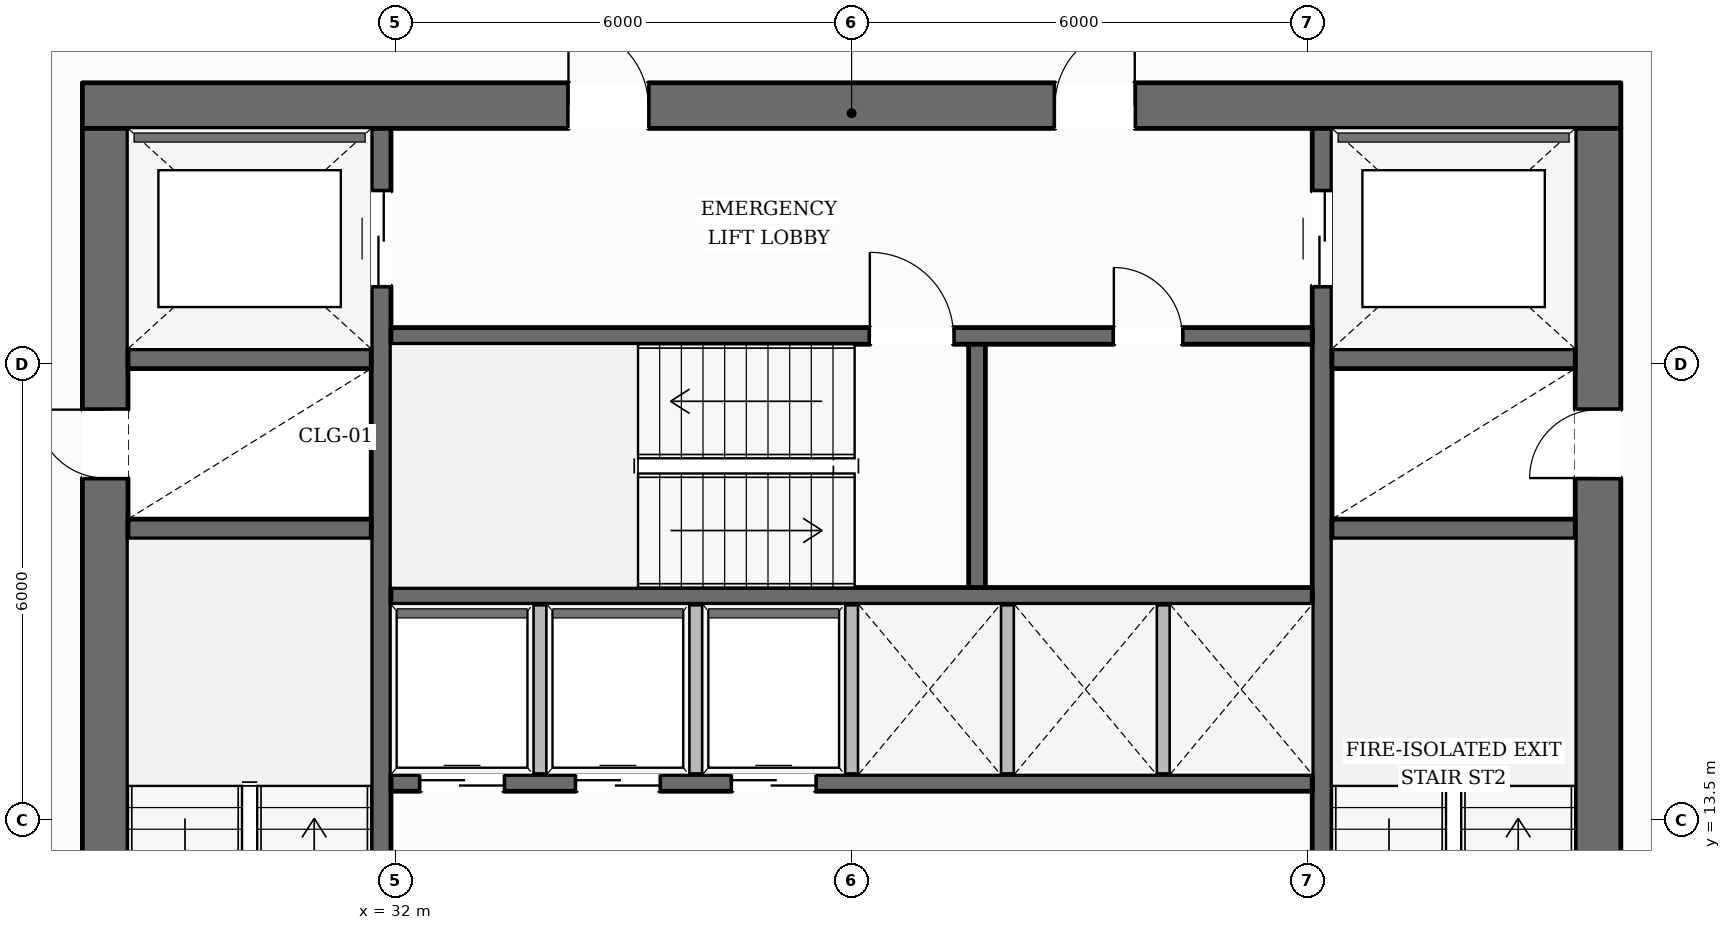
"""IFC4 building model, lengths in metres.
Left out: names, types, materials, properties, quantities, classifications, styles, units other than length and angle.
Written with IfcOpenShell. Run it as: python <this file> out.ifc"""

import sys

from ifc_helpers import new_model, si_unit, direction, frame, frame_2d, origin, place, context, subcontext, project, spatial, rectangle, extrude, element, fill, save


model = new_model("IFC4")
c1 = context("Model", 3, precision=1e-05, world=origin(), true_north=direction((0.0, 1.0)))
c2 = subcontext(c1, "Body", "Model", "MODEL_VIEW")
j1 = project(units=[si_unit("LENGTHUNIT", "METRE"), si_unit("PLANEANGLEUNIT", "RADIAN")], contexts=[c1])
p1 = place(None, origin())
s1 = spatial("IfcSite", under=j1, at=p1, CompositionType="ELEMENT")
p2 = place(p1, origin())
s2 = spatial("IfcBuilding", under=s1, at=p2, CompositionType="ELEMENT")
p3 = place(p2, frame((0.0, 0.0, 25.25)))
s3 = spatial("IfcBuildingStorey", under=s2, at=p3, CompositionType="ELEMENT", Elevation=25.25)
p4 = place(p3, frame((27.88, 22.9, 0.0), z_axis=(0.0, 0.0, 1.0), x_axis=(1.0, 0.0, 0.0)))
e1 = element("IfcWall", 1, at=p4, inside=s3, PredefinedType="SOLIDWALL", context=c2, shape_type="SweptSolid", body=[
    extrude(rectangle(XDim=20.24, YDim=0.6, at=frame_2d((10.12, 0.0))), origin(), (0.0, 0.0, 1.0), 3.59),
])
p5 = place(p4, frame((6.395, 0.0, 0.0)))
e2 = element("IfcOpeningElement", 2, at=p5, cuts=e1, PredefinedType="OPENING", context=c2, shape_type="SweptSolid", body=[
    extrude(rectangle(XDim=1.05, YDim=2.15, at=frame_2d((0.525, 1.075))), frame((0.0, 0.31, 0.0), z_axis=(0.0, -1.0, 0.0), x_axis=(1.0, 0.0, 0.0)), (0.0, 0.0, 1.0), 0.62),
])
p6 = place(p4, frame((12.795, 0.0, 0.0)))
e3 = element("IfcOpeningElement", 3, at=p6, cuts=e1, PredefinedType="OPENING", context=c2, shape_type="SweptSolid", body=[
    extrude(rectangle(XDim=1.05, YDim=2.15, at=frame_2d((0.525, 1.075))), frame((0.0, 0.31, 0.0), z_axis=(0.0, -1.0, 0.0), x_axis=(1.0, 0.0, 0.0)), (0.0, 0.0, 1.0), 0.62),
])
p7 = place(p3, frame((28.18, 9.6, 0.0), z_axis=(0.0, 0.0, 1.0), x_axis=(0.0, 1.0, 0.0)))
e4 = element("IfcWall", 4, at=p7, inside=s3, PredefinedType="SOLIDWALL", context=c2, shape_type="SweptSolid", body=[
    extrude(rectangle(XDim=13.0, YDim=0.6, at=frame_2d((6.5, 0.0))), origin(), (0.0, 0.0, 1.0), 3.59),
])
p8 = place(p7, frame((0.2, 0.0, 0.0)))
e5 = element("IfcOpeningElement", 5, at=p8, cuts=e4, PredefinedType="OPENING", context=c2, shape_type="SweptSolid", body=[
    extrude(rectangle(XDim=1.1, YDim=2.15, at=frame_2d((0.55, 1.075))), frame((0.0, 0.31, 0.0), z_axis=(0.0, -1.0, 0.0), x_axis=(1.0, 0.0, 0.0)), (0.0, 0.0, 1.0), 0.62),
])
p9 = place(p7, frame((8.4, 0.0, 0.0)))
e6 = element("IfcOpeningElement", 6, at=p9, cuts=e4, PredefinedType="OPENING", context=c2, shape_type="SweptSolid", body=[
    extrude(rectangle(XDim=0.9, YDim=2.1, at=frame_2d((0.45, 1.05))), frame((0.0, 0.31, 0.0), z_axis=(0.0, -1.0, 0.0), x_axis=(1.0, 0.0, 0.0)), (0.0, 0.0, 1.0), 0.62),
])
p10 = place(p3, frame((47.82, 9.6, 0.0), z_axis=(0.0, 0.0, 1.0), x_axis=(0.0, 1.0, 0.0)))
e7 = element("IfcWall", 7, at=p10, inside=s3, PredefinedType="SOLIDWALL", context=c2, shape_type="SweptSolid", body=[
    extrude(rectangle(XDim=13.0, YDim=0.6, at=frame_2d((6.5, 0.0))), origin(), (0.0, 0.0, 1.0), 3.59),
])
p11 = place(p10, frame((0.2, 0.0, 0.0)))
e8 = element("IfcOpeningElement", 8, at=p11, cuts=e7, PredefinedType="OPENING", context=c2, shape_type="SweptSolid", body=[
    extrude(rectangle(XDim=1.1, YDim=2.15, at=frame_2d((0.55, 1.075))), frame((0.0, 0.31, 0.0), z_axis=(0.0, -1.0, 0.0), x_axis=(1.0, 0.0, 0.0)), (0.0, 0.0, 1.0), 0.62),
])
p12 = place(p10, frame((8.4, 0.0, 0.0)))
e9 = element("IfcOpeningElement", 9, at=p12, cuts=e7, PredefinedType="OPENING", context=c2, shape_type="SweptSolid", body=[
    extrude(rectangle(XDim=0.9, YDim=2.1, at=frame_2d((0.45, 1.05))), frame((0.0, 0.31, 0.0), z_axis=(0.0, -1.0, 0.0), x_axis=(1.0, 0.0, 0.0)), (0.0, 0.0, 1.0), 0.62),
])
p13 = place(p3, frame((31.81, 9.6, 0.0), z_axis=(0.0, 0.0, 1.0), x_axis=(0.0, 1.0, 0.0)))
e10 = element("IfcWall", 10, at=p13, inside=s3, PredefinedType="SHEAR", context=c2, shape_type="SweptSolid", body=[
    extrude(rectangle(XDim=13.0, YDim=0.26, at=frame_2d((6.5, 0.0))), origin(), (0.0, 0.0, 1.0), 3.59),
])
p14 = place(p13, frame((10.925, 0.0, 0.0)))
e11 = element("IfcOpeningElement", 11, at=p14, cuts=e10, PredefinedType="OPENING", context=c2, shape_type="SweptSolid", body=[
    extrude(rectangle(XDim=1.25, YDim=2.25, at=frame_2d((0.625, 1.125))), frame((0.0, 0.14, 0.0), z_axis=(0.0, -1.0, 0.0), x_axis=(1.0, 0.0, 0.0)), (0.0, 0.0, 1.0), 0.28),
])
p15 = place(p3, frame((44.19, 9.6, 0.0), z_axis=(0.0, 0.0, 1.0), x_axis=(0.0, 1.0, 0.0)))
e12 = element("IfcWall", 12, at=p15, inside=s3, PredefinedType="SHEAR", context=c2, shape_type="SweptSolid", body=[
    extrude(rectangle(XDim=13.0, YDim=0.26, at=frame_2d((6.5, 0.0))), origin(), (0.0, 0.0, 1.0), 3.59),
])
p16 = place(p15, frame((10.925, 0.0, 0.0)))
e13 = element("IfcOpeningElement", 13, at=p16, cuts=e12, PredefinedType="OPENING", context=c2, shape_type="SweptSolid", body=[
    extrude(rectangle(XDim=1.25, YDim=2.25, at=frame_2d((0.625, 1.125))), frame((0.0, 0.14, 0.0), z_axis=(0.0, -1.0, 0.0), x_axis=(1.0, 0.0, 0.0)), (0.0, 0.0, 1.0), 0.28),
])
for number, where, z_axis, x_axis in (
    (14, (28.48, 17.33, 0.0), (0.0, 0.0, 1.0), (1.0, 0.0, 0.0)),
    (15, (28.48, 19.57, 0.0), (0.0, 0.0, 1.0), (1.0, 0.0, 0.0)),
    (16, (44.32, 17.33, 0.0), (0.0, 0.0, 1.0), (1.0, 0.0, 0.0)),
    (17, (44.32, 19.57, 0.0), (0.0, 0.0, 1.0), (1.0, 0.0, 0.0)),
):
    element("IfcWall", number, at=place(p3, frame(where, z_axis=z_axis, x_axis=x_axis)), inside=s3, PredefinedType="SHEAR", context=c2, shape_type="SweptSolid", body=[
        extrude(rectangle(XDim=3.2, YDim=0.26, at=frame_2d((1.6, 0.0))), origin(), (0.0, 0.0, 1.0), 3.59),
    ])
p17 = place(p3, frame((31.94, 19.87, 0.0), z_axis=(0.0, 0.0, 1.0), x_axis=(1.0, 0.0, 0.0)))
e18 = element("IfcWall", 18, at=p17, inside=s3, PredefinedType="SOLIDWALL", context=c2, shape_type="SweptSolid", body=[
    extrude(rectangle(XDim=12.12, YDim=0.22, at=frame_2d((6.06, 0.0))), origin(), (0.0, 0.0, 1.0), 3.59),
])
p18 = place(p17, frame((6.3, 0.0, 0.0)))
e19 = element("IfcOpeningElement", 19, at=p18, cuts=e18, PredefinedType="OPENING", context=c2, shape_type="SweptSolid", body=[
    extrude(rectangle(XDim=1.1, YDim=2.15, at=frame_2d((0.55, 1.075))), frame((0.0, 0.12, 0.0), z_axis=(0.0, -1.0, 0.0), x_axis=(1.0, 0.0, 0.0)), (0.0, 0.0, 1.0), 0.24),
])
p19 = place(p17, frame((9.51, 0.0, 0.0)))
e20 = element("IfcOpeningElement", 20, at=p19, cuts=e18, PredefinedType="OPENING", context=c2, shape_type="SweptSolid", body=[
    extrude(rectangle(XDim=0.9, YDim=2.1, at=frame_2d((0.45, 1.05))), frame((0.0, 0.12, 0.0), z_axis=(0.0, -1.0, 0.0), x_axis=(1.0, 0.0, 0.0)), (0.0, 0.0, 1.0), 0.24),
])
p20 = place(p3, frame((31.94, 16.45, 0.0), z_axis=(0.0, 0.0, 1.0), x_axis=(1.0, 0.0, 0.0)))
e21 = element("IfcWall", 21, at=p20, inside=s3, PredefinedType="SOLIDWALL", context=c2, shape_type="SweptSolid", body=[
    extrude(rectangle(XDim=12.12, YDim=0.22, at=frame_2d((6.06, 0.0))), origin(), (0.0, 0.0, 1.0), 3.59),
])
p21 = place(p3, frame((39.65, 16.56, 0.0), z_axis=(0.0, 0.0, 1.0), x_axis=(0.0, 1.0, 0.0)))
e22 = element("IfcWall", 22, at=p21, inside=s3, PredefinedType="SOLIDWALL", context=c2, shape_type="SweptSolid", body=[
    extrude(rectangle(XDim=3.2, YDim=0.22, at=frame_2d((1.6, 0.0))), origin(), (0.0, 0.0, 1.0), 3.59),
])
p22 = place(p3, frame((31.94, 13.99, 0.0), z_axis=(0.0, 0.0, 1.0), x_axis=(1.0, 0.0, 0.0)))
e23 = element("IfcWall", 23, at=p22, inside=s3, PredefinedType="SOLIDWALL", context=c2, shape_type="SweptSolid", body=[
    extrude(rectangle(XDim=12.12, YDim=0.22, at=frame_2d((6.06, 0.0))), origin(), (0.0, 0.0, 1.0), 3.59),
])
p23 = place(p22, frame((0.385, 0.0, 0.0)))
e24 = element("IfcOpeningElement", 24, at=p23, cuts=e23, PredefinedType="OPENING", context=c2, shape_type="SweptSolid", body=[
    extrude(rectangle(XDim=1.1, YDim=2.2, at=frame_2d((0.55, 1.1))), frame((0.0, 0.12, 0.0), z_axis=(0.0, -1.0, 0.0), x_axis=(1.0, 0.0, 0.0)), (0.0, 0.0, 1.0), 0.24),
])
p24 = place(p22, frame((2.435, 0.0, 0.0)))
e25 = element("IfcOpeningElement", 25, at=p24, cuts=e23, PredefinedType="OPENING", context=c2, shape_type="SweptSolid", body=[
    extrude(rectangle(XDim=1.1, YDim=2.2, at=frame_2d((0.55, 1.1))), frame((0.0, 0.12, 0.0), z_axis=(0.0, -1.0, 0.0), x_axis=(1.0, 0.0, 0.0)), (0.0, 0.0, 1.0), 0.24),
])
p25 = place(p22, frame((4.485, 0.0, 0.0)))
e26 = element("IfcOpeningElement", 26, at=p25, cuts=e23, PredefinedType="OPENING", context=c2, shape_type="SweptSolid", body=[
    extrude(rectangle(XDim=1.1, YDim=2.2, at=frame_2d((0.55, 1.1))), frame((0.0, 0.12, 0.0), z_axis=(0.0, -1.0, 0.0), x_axis=(1.0, 0.0, 0.0)), (0.0, 0.0, 1.0), 0.24),
])
p26 = place(p3, frame((13.263, 14.928, 0.0), z_axis=(0.0, 0.0, 1.0), x_axis=(0.495711630902, 0.868487178367, 0.0)))
e27 = element("IfcWall", 27, at=p26, inside=s3, PredefinedType="STANDARD", context=c2, shape_type="SweptSolid", body=[
    extrude(rectangle(XDim=34.092, YDim=0.38, at=frame_2d((17.046, 0.0))), origin(), (0.0, 0.0, 1.0), 2.97),
])
p27 = place(p26, frame((30.027, 0.0, 0.65)))
e28 = element("IfcOpeningElement", 28, at=p27, cuts=e27, PredefinedType="OPENING", context=c2, shape_type="SweptSolid", body=[
    extrude(rectangle(XDim=1.65, YDim=1.75, at=frame_2d((0.825, 0.875))), frame((0.0, 0.2, 0.0), z_axis=(0.0, -1.0, 0.0), x_axis=(1.0, 0.0, 0.0)), (0.0, 0.0, 1.0), 0.4),
])
p28 = place(p26, frame((24.504, 0.0, 0.65)))
e29 = element("IfcOpeningElement", 29, at=p28, cuts=e27, PredefinedType="OPENING", context=c2, shape_type="SweptSolid", body=[
    extrude(rectangle(XDim=1.65, YDim=1.75, at=frame_2d((0.825, 0.875))), frame((0.0, 0.2, 0.0), z_axis=(0.0, -1.0, 0.0), x_axis=(1.0, 0.0, 0.0)), (0.0, 0.0, 1.0), 0.4),
])
p29 = place(p26, frame((13.457, 0.0, 0.65)))
e30 = element("IfcOpeningElement", 30, at=p29, cuts=e27, PredefinedType="OPENING", context=c2, shape_type="SweptSolid", body=[
    extrude(rectangle(XDim=1.65, YDim=1.75, at=frame_2d((0.825, 0.875))), frame((0.0, 0.2, 0.0), z_axis=(0.0, -1.0, 0.0), x_axis=(1.0, 0.0, 0.0)), (0.0, 0.0, 1.0), 0.4),
])
p30 = place(p26, frame((7.934, 0.0, 0.65)))
e31 = element("IfcOpeningElement", 31, at=p30, cuts=e27, PredefinedType="OPENING", context=c2, shape_type="SweptSolid", body=[
    extrude(rectangle(XDim=1.65, YDim=1.75, at=frame_2d((0.825, 0.875))), frame((0.0, 0.2, 0.0), z_axis=(0.0, -1.0, 0.0), x_axis=(1.0, 0.0, 0.0)), (0.0, 0.0, 1.0), 0.4),
])
p31 = place(p26, frame((2.411, 0.0, 0.65)))
e32 = element("IfcOpeningElement", 32, at=p31, cuts=e27, PredefinedType="OPENING", context=c2, shape_type="SweptSolid", body=[
    extrude(rectangle(XDim=1.65, YDim=1.75, at=frame_2d((0.825, 0.875))), frame((0.0, 0.2, 0.0), z_axis=(0.0, -1.0, 0.0), x_axis=(1.0, 0.0, 0.0)), (0.0, 0.0, 1.0), 0.4),
])
p32 = place(p3, frame((45.837, 44.537, 0.0), z_axis=(0.0, 0.0, 1.0), x_axis=(0.495711630902, -0.868487178367, 0.0)))
e33 = element("IfcWall", 33, at=p32, inside=s3, PredefinedType="STANDARD", context=c2, shape_type="SweptSolid", body=[
    extrude(rectangle(XDim=34.092, YDim=0.38, at=frame_2d((17.046, 0.0))), origin(), (0.0, 0.0, 1.0), 2.97),
])
p33 = place(p32, frame((30.031, 0.0, 0.65)))
e34 = element("IfcOpeningElement", 34, at=p33, cuts=e33, PredefinedType="OPENING", context=c2, shape_type="SweptSolid", body=[
    extrude(rectangle(XDim=1.65, YDim=1.75, at=frame_2d((0.825, 0.875))), frame((0.0, 0.2, 0.0), z_axis=(0.0, -1.0, 0.0), x_axis=(1.0, 0.0, 0.0)), (0.0, 0.0, 1.0), 0.4),
])
p34 = place(p32, frame((24.508, 0.0, 0.65)))
e35 = element("IfcOpeningElement", 35, at=p34, cuts=e33, PredefinedType="OPENING", context=c2, shape_type="SweptSolid", body=[
    extrude(rectangle(XDim=1.65, YDim=1.75, at=frame_2d((0.825, 0.875))), frame((0.0, 0.2, 0.0), z_axis=(0.0, -1.0, 0.0), x_axis=(1.0, 0.0, 0.0)), (0.0, 0.0, 1.0), 0.4),
])
p35 = place(p32, frame((13.462, 0.0, 0.65)))
e36 = element("IfcOpeningElement", 36, at=p35, cuts=e33, PredefinedType="OPENING", context=c2, shape_type="SweptSolid", body=[
    extrude(rectangle(XDim=1.65, YDim=1.75, at=frame_2d((0.825, 0.875))), frame((0.0, 0.2, 0.0), z_axis=(0.0, -1.0, 0.0), x_axis=(1.0, 0.0, 0.0)), (0.0, 0.0, 1.0), 0.4),
])
p36 = place(p32, frame((7.939, 0.0, 0.65)))
e37 = element("IfcOpeningElement", 37, at=p36, cuts=e33, PredefinedType="OPENING", context=c2, shape_type="SweptSolid", body=[
    extrude(rectangle(XDim=1.65, YDim=1.75, at=frame_2d((0.825, 0.875))), frame((0.0, 0.2, 0.0), z_axis=(0.0, -1.0, 0.0), x_axis=(1.0, 0.0, 0.0)), (0.0, 0.0, 1.0), 0.4),
])
p37 = place(p32, frame((2.415, 0.0, 0.65)))
e38 = element("IfcOpeningElement", 38, at=p37, cuts=e33, PredefinedType="OPENING", context=c2, shape_type="SweptSolid", body=[
    extrude(rectangle(XDim=1.65, YDim=1.75, at=frame_2d((0.825, 0.875))), frame((0.0, 0.2, 0.0), z_axis=(0.0, -1.0, 0.0), x_axis=(1.0, 0.0, 0.0)), (0.0, 0.0, 1.0), 0.4),
])
for number, where, z_axis, x_axis in (
    (39, (33.9, 14.1, 0.0), (0.0, 0.0, 1.0), (0.0, 1.0, 0.0)),
    (40, (35.95, 14.1, 0.0), (0.0, 0.0, 1.0), (0.0, 1.0, 0.0)),
    (41, (38.0, 14.1, 0.0), (0.0, 0.0, 1.0), (0.0, 1.0, 0.0)),
    (42, (40.05, 14.1, 0.0), (0.0, 0.0, 1.0), (0.0, 1.0, 0.0)),
    (43, (42.1, 14.1, 0.0), (0.0, 0.0, 1.0), (0.0, 1.0, 0.0)),
):
    element("IfcWall", number, at=place(p3, frame(where, z_axis=z_axis, x_axis=x_axis)), inside=s3, PredefinedType="PARTITIONING", context=c2, shape_type="SweptSolid", body=[
        extrude(rectangle(XDim=2.24, YDim=0.165, at=frame_2d((1.12, 0.0))), origin(), (0.0, 0.0, 1.0), 3.59),
    ])
p38 = place(p18, origin())
e44 = element("IfcDoor", 44, at=p38, inside=s3, OperationType="SINGLE_SWING_LEFT", PredefinedType="DOOR", context=c2, shape_type="SweptSolid", body=[
    extrude(rectangle(XDim=1.1, YDim=2.15, at=frame_2d((0.55, 1.075))), frame((0.0, 0.025, 0.0), z_axis=(0.0, -1.0, 0.0), x_axis=(1.0, 0.0, 0.0)), (0.0, 0.0, 1.0), 0.05),
])
fill(e19, e44)
p39 = place(p9, origin())
e45 = element("IfcDoor", 45, at=p39, inside=s3, OperationType="SINGLE_SWING_RIGHT", PredefinedType="DOOR", context=c2, shape_type="SweptSolid", body=[
    extrude(rectangle(XDim=0.9, YDim=2.1, at=frame_2d((0.45, 1.05))), frame((0.0, 0.025, 0.0), z_axis=(0.0, -1.0, 0.0), x_axis=(1.0, 0.0, 0.0)), (0.0, 0.0, 1.0), 0.05),
])
fill(e6, e45)
p40 = place(p12, origin())
e46 = element("IfcDoor", 46, at=p40, inside=s3, OperationType="SINGLE_SWING_LEFT", PredefinedType="DOOR", context=c2, shape_type="SweptSolid", body=[
    extrude(rectangle(XDim=0.9, YDim=2.1, at=frame_2d((0.45, 1.05))), frame((0.0, 0.025, 0.0), z_axis=(0.0, -1.0, 0.0), x_axis=(1.0, 0.0, 0.0)), (0.0, 0.0, 1.0), 0.05),
])
fill(e9, e46)
p41 = place(p5, origin())
e47 = element("IfcDoor", 47, at=p41, inside=s3, OperationType="SINGLE_SWING_LEFT", PredefinedType="DOOR", context=c2, shape_type="SweptSolid", body=[
    extrude(rectangle(XDim=1.05, YDim=2.15, at=frame_2d((0.525, 1.075))), frame((0.0, 0.025, 0.0), z_axis=(0.0, -1.0, 0.0), x_axis=(1.0, 0.0, 0.0)), (0.0, 0.0, 1.0), 0.05),
])
fill(e2, e47)
p42 = place(p6, origin())
e48 = element("IfcDoor", 48, at=p42, inside=s3, OperationType="SINGLE_SWING_RIGHT", PredefinedType="DOOR", context=c2, shape_type="SweptSolid", body=[
    extrude(rectangle(XDim=1.05, YDim=2.15, at=frame_2d((0.525, 1.075))), frame((0.0, 0.025, 0.0), z_axis=(0.0, -1.0, 0.0), x_axis=(1.0, 0.0, 0.0)), (0.0, 0.0, 1.0), 0.05),
])
fill(e3, e48)
p43 = place(p14, origin())
e49 = element("IfcDoor", 49, at=p43, inside=s3, OperationType="DOUBLE_DOOR_SLIDING", PredefinedType="DOOR", context=c2, shape_type="SweptSolid", body=[
    extrude(rectangle(XDim=1.25, YDim=2.25, at=frame_2d((0.625, 1.125))), frame((0.0, 0.025, 0.0), z_axis=(0.0, -1.0, 0.0), x_axis=(1.0, 0.0, 0.0)), (0.0, 0.0, 1.0), 0.05),
])
fill(e11, e49)
p44 = place(p16, origin())
e50 = element("IfcDoor", 50, at=p44, inside=s3, OperationType="DOUBLE_DOOR_SLIDING", PredefinedType="DOOR", context=c2, shape_type="SweptSolid", body=[
    extrude(rectangle(XDim=1.25, YDim=2.25, at=frame_2d((0.625, 1.125))), frame((0.0, 0.025, 0.0), z_axis=(0.0, -1.0, 0.0), x_axis=(1.0, 0.0, 0.0)), (0.0, 0.0, 1.0), 0.05),
])
fill(e13, e50)
p45 = place(p23, origin())
e51 = element("IfcDoor", 51, at=p45, inside=s3, OperationType="DOUBLE_DOOR_SLIDING", PredefinedType="DOOR", context=c2, shape_type="SweptSolid", body=[
    extrude(rectangle(XDim=1.1, YDim=2.2, at=frame_2d((0.55, 1.1))), frame((0.0, 0.025, 0.0), z_axis=(0.0, -1.0, 0.0), x_axis=(1.0, 0.0, 0.0)), (0.0, 0.0, 1.0), 0.05),
])
fill(e24, e51)
p46 = place(p24, origin())
e52 = element("IfcDoor", 52, at=p46, inside=s3, OperationType="DOUBLE_DOOR_SLIDING", PredefinedType="DOOR", context=c2, shape_type="SweptSolid", body=[
    extrude(rectangle(XDim=1.1, YDim=2.2, at=frame_2d((0.55, 1.1))), frame((0.0, 0.025, 0.0), z_axis=(0.0, -1.0, 0.0), x_axis=(1.0, 0.0, 0.0)), (0.0, 0.0, 1.0), 0.05),
])
fill(e25, e52)
p47 = place(p25, origin())
e53 = element("IfcDoor", 53, at=p47, inside=s3, OperationType="DOUBLE_DOOR_SLIDING", PredefinedType="DOOR", context=c2, shape_type="SweptSolid", body=[
    extrude(rectangle(XDim=1.1, YDim=2.2, at=frame_2d((0.55, 1.1))), frame((0.0, 0.025, 0.0), z_axis=(0.0, -1.0, 0.0), x_axis=(1.0, 0.0, 0.0)), (0.0, 0.0, 1.0), 0.05),
])
fill(e26, e53)
p48 = place(p19, origin())
e54 = element("IfcDoor", 54, at=p48, inside=s3, OperationType="SINGLE_SWING_LEFT", PredefinedType="DOOR", context=c2, shape_type="SweptSolid", body=[
    extrude(rectangle(XDim=0.9, YDim=2.1, at=frame_2d((0.45, 1.05))), frame((0.0, 0.025, 0.0), z_axis=(0.0, -1.0, 0.0), x_axis=(1.0, 0.0, 0.0)), (0.0, 0.0, 1.0), 0.05),
])
fill(e20, e54)
save(model, sys.argv[1])
